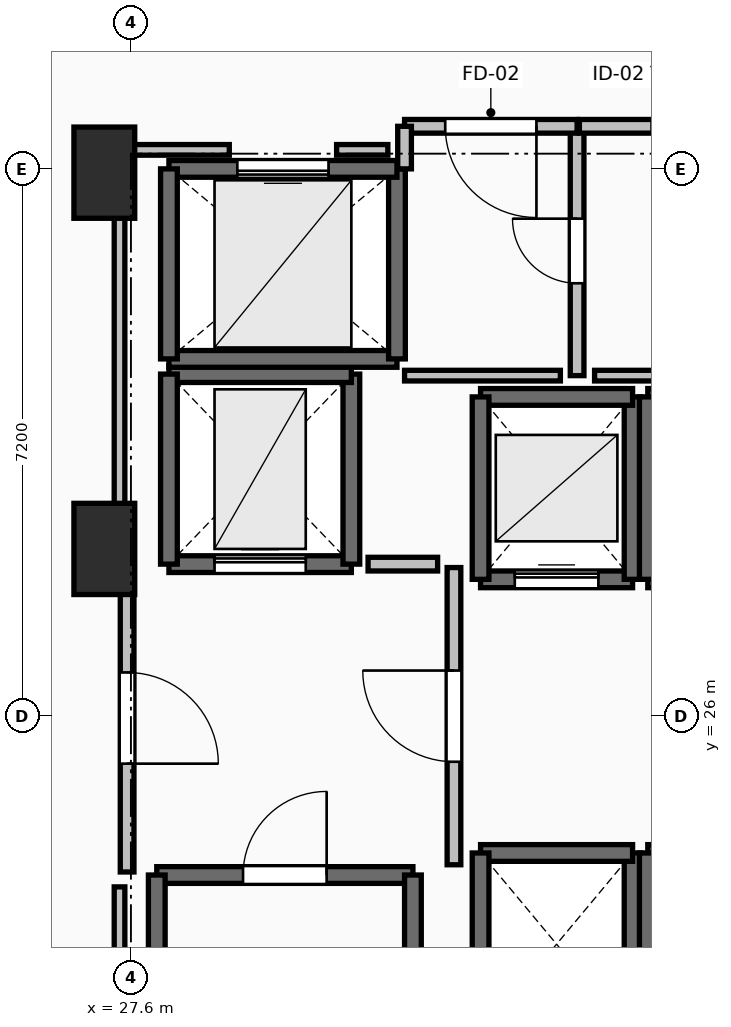
"""IFC4 building model, lengths in metres.
Left out: names, types, materials, properties, quantities, classifications, styles, units other than length and angle.
Written with IfcOpenShell. Run it as: python <this file> out.ifc"""

import sys

from ifc_helpers import new_model, si_unit, direction, frame, frame_2d, origin, origin_2d, place, context, subcontext, project, spatial, rectangle, extrude, element, fill, save


model = new_model("IFC4")
c1 = context("Model", 3, precision=1e-05, world=origin(), true_north=direction((0.0, 1.0)))
c2 = subcontext(c1, "Body", "Model", "MODEL_VIEW")
j1 = project(units=[si_unit("LENGTHUNIT", "METRE"), si_unit("PLANEANGLEUNIT", "RADIAN")], contexts=[c1])
p1 = place(None, origin())
s1 = spatial("IfcSite", under=j1, at=p1, CompositionType="ELEMENT")
p2 = place(p1, origin())
s2 = spatial("IfcBuilding", under=s1, at=p2, CompositionType="ELEMENT")
p3 = place(p2, frame((0.0, 0.0, 48.5)))
s3 = spatial("IfcBuildingStorey", under=s2, at=p3, CompositionType="ELEMENT", Elevation=48.5)
for number, where, z_axis, x_axis in (
    (1, (27.25, 28.2, 0.0), (0.0, 0.0, 1.0), (1.0, 0.0, 0.0)),
    (2, (27.25, 33.15, 0.0), (0.0, 0.0, 1.0), (1.0, 0.0, 0.0)),
):
    element("IfcColumn", number, at=place(p3, frame(where, z_axis=z_axis, x_axis=x_axis)), inside=s3, PredefinedType="PILASTER", context=c2, shape_type="SweptSolid", body=[
        extrude(rectangle(XDim=0.8, YDim=1.2, at=origin_2d()), origin(), (0.0, 0.0, 1.0), 3.5),
    ])
p4 = place(p3, frame((27.94, 23.91, 0.0), z_axis=(0.0, 0.0, 1.0), x_axis=(1.0, 0.0, 0.0)))
e3 = element("IfcWall", 3, at=p4, inside=s3, PredefinedType="SOLIDWALL", context=c2, shape_type="SweptSolid", body=[
    extrude(rectangle(XDim=3.37, YDim=0.22, at=frame_2d((1.685, 0.0))), origin(), (0.0, 0.0, 1.0), 3.24),
])
p5 = place(p4, frame((1.135, 0.0, 0.0)))
e4 = element("IfcOpeningElement", 4, at=p5, cuts=e3, PredefinedType="OPENING", context=c2, shape_type="SweptSolid", body=[
    extrude(rectangle(XDim=1.1, YDim=2.15, at=frame_2d((0.55, 1.075))), frame((0.0, 0.125, 0.0), z_axis=(0.0, -1.0, 0.0), x_axis=(1.0, 0.0, 0.0)), (0.0, 0.0, 1.0), 0.25),
])
for number, where, z_axis, x_axis in (
    (5, (31.31, 23.91, 0.0), (0.0, 0.0, 1.0), (0.0, -1.0, 0.0)),
    (6, (27.94, 16.49, 0.0), (0.0, 0.0, 1.0), (0.0, 1.0, 0.0)),
):
    element("IfcWall", number, at=place(p3, frame(where, z_axis=z_axis, x_axis=x_axis)), inside=s3, PredefinedType="SOLIDWALL", context=c2, shape_type="SweptSolid", body=[
        extrude(rectangle(XDim=7.42, YDim=0.22, at=frame_2d((3.71, 0.0))), origin(), (0.0, 0.0, 1.0), 3.24),
    ])
p6 = place(p3, frame((32.2, 27.8, 0.0), z_axis=(0.0, 0.0, 1.0), x_axis=(1.0, 0.0, 0.0)))
e7 = element("IfcWall", 7, at=p6, inside=s3, PredefinedType="SOLIDWALL", context=c2, shape_type="SweptSolid", body=[
    extrude(rectangle(XDim=2.0, YDim=0.22, at=frame_2d((1.0, 0.0))), origin(), (0.0, 0.0, 1.0), 3.24),
])
p7 = place(p6, frame((0.45, 0.0, 0.0)))
e8 = element("IfcOpeningElement", 8, at=p7, cuts=e7, PredefinedType="OPENING", context=c2, shape_type="SweptSolid", body=[
    extrude(rectangle(XDim=1.1, YDim=2.2, at=frame_2d((0.55, 1.1))), frame((0.0, 0.125, 0.0), z_axis=(0.0, -1.0, 0.0), x_axis=(1.0, 0.0, 0.0)), (0.0, 0.0, 1.0), 0.25),
])
p8 = place(p3, frame((34.2, 27.8, 0.0), z_axis=(0.0, 0.0, 1.0), x_axis=(0.0, 1.0, 0.0)))
e9 = element("IfcWall", 9, at=p8, inside=s3, PredefinedType="SOLIDWALL", context=c2, shape_type="SweptSolid", body=[
    extrude(rectangle(XDim=2.4, YDim=0.22, at=frame_2d((1.2, 0.0))), origin(), (0.0, 0.0, 1.0), 3.24),
])
p9 = place(p3, frame((34.2, 30.2, 0.0), z_axis=(0.0, 0.0, 1.0), x_axis=(-1.0, 0.0, 0.0)))
e10 = element("IfcWall", 10, at=p9, inside=s3, PredefinedType="SOLIDWALL", context=c2, shape_type="SweptSolid", body=[
    extrude(rectangle(XDim=2.0, YDim=0.22, at=frame_2d((1.0, 0.0))), origin(), (0.0, 0.0, 1.0), 3.24),
])
p10 = place(p3, frame((32.2, 30.2, 0.0), z_axis=(0.0, 0.0, 1.0), x_axis=(0.0, -1.0, 0.0)))
e11 = element("IfcWall", 11, at=p10, inside=s3, PredefinedType="SOLIDWALL", context=c2, shape_type="SweptSolid", body=[
    extrude(rectangle(XDim=2.4, YDim=0.22, at=frame_2d((1.2, 0.0))), origin(), (0.0, 0.0, 1.0), 3.24),
])
p11 = place(p3, frame((34.4, 27.8, 0.0), z_axis=(0.0, 0.0, 1.0), x_axis=(1.0, 0.0, 0.0)))
e12 = element("IfcWall", 12, at=p11, inside=s3, PredefinedType="SOLIDWALL", context=c2, shape_type="SweptSolid", body=[
    extrude(rectangle(XDim=2.0, YDim=0.22, at=frame_2d((1.0, 0.0))), origin(), (0.0, 0.0, 1.0), 3.24),
])
p12 = place(p11, frame((0.45, 0.0, 0.0)))
e13 = element("IfcOpeningElement", 13, at=p12, cuts=e12, PredefinedType="OPENING", context=c2, shape_type="SweptSolid", body=[
    extrude(rectangle(XDim=1.1, YDim=2.2, at=frame_2d((0.55, 1.1))), frame((0.0, 0.125, 0.0), z_axis=(0.0, -1.0, 0.0), x_axis=(1.0, 0.0, 0.0)), (0.0, 0.0, 1.0), 0.25),
])
p13 = place(p3, frame((36.4, 30.2, 0.0), z_axis=(0.0, 0.0, 1.0), x_axis=(-1.0, 0.0, 0.0)))
e14 = element("IfcWall", 14, at=p13, inside=s3, PredefinedType="SOLIDWALL", context=c2, shape_type="SweptSolid", body=[
    extrude(rectangle(XDim=2.0, YDim=0.22, at=frame_2d((1.0, 0.0))), origin(), (0.0, 0.0, 1.0), 3.24),
])
for number, where, z_axis, x_axis in (
    (15, (34.4, 30.2, 0.0), (0.0, 0.0, 1.0), (0.0, -1.0, 0.0)),
    (16, (34.2, 21.8, 0.0), (0.0, 0.0, 1.0), (0.0, 1.0, 0.0)),
):
    element("IfcWall", number, at=place(p3, frame(where, z_axis=z_axis, x_axis=x_axis)), inside=s3, PredefinedType="SOLIDWALL", context=c2, shape_type="SweptSolid", body=[
        extrude(rectangle(XDim=2.4, YDim=0.22, at=frame_2d((1.2, 0.0))), origin(), (0.0, 0.0, 1.0), 3.24),
    ])
p14 = place(p3, frame((34.2, 24.2, 0.0), z_axis=(0.0, 0.0, 1.0), x_axis=(-1.0, 0.0, 0.0)))
e17 = element("IfcWall", 17, at=p14, inside=s3, PredefinedType="SOLIDWALL", context=c2, shape_type="SweptSolid", body=[
    extrude(rectangle(XDim=2.0, YDim=0.22, at=frame_2d((1.0, 0.0))), origin(), (0.0, 0.0, 1.0), 3.24),
])
p15 = place(p3, frame((32.2, 24.2, 0.0), z_axis=(0.0, 0.0, 1.0), x_axis=(0.0, -1.0, 0.0)))
e18 = element("IfcWall", 18, at=p15, inside=s3, PredefinedType="SOLIDWALL", context=c2, shape_type="SweptSolid", body=[
    extrude(rectangle(XDim=2.4, YDim=0.22, at=frame_2d((1.2, 0.0))), origin(), (0.0, 0.0, 1.0), 3.24),
])
p16 = place(p3, frame((36.4, 24.2, 0.0), z_axis=(0.0, 0.0, 1.0), x_axis=(-1.0, 0.0, 0.0)))
e19 = element("IfcWall", 19, at=p16, inside=s3, PredefinedType="SOLIDWALL", context=c2, shape_type="SweptSolid", body=[
    extrude(rectangle(XDim=2.0, YDim=0.22, at=frame_2d((1.0, 0.0))), origin(), (0.0, 0.0, 1.0), 3.24),
])
p17 = place(p3, frame((34.4, 24.2, 0.0), z_axis=(0.0, 0.0, 1.0), x_axis=(0.0, -1.0, 0.0)))
e20 = element("IfcWall", 20, at=p17, inside=s3, PredefinedType="SOLIDWALL", context=c2, shape_type="SweptSolid", body=[
    extrude(rectangle(XDim=2.4, YDim=0.22, at=frame_2d((1.2, 0.0))), origin(), (0.0, 0.0, 1.0), 3.24),
])
p18 = place(p3, frame((28.1, 28.0, 0.0), z_axis=(0.0, 0.0, 1.0), x_axis=(1.0, 0.0, 0.0)))
e21 = element("IfcWall", 21, at=p18, inside=s3, PredefinedType="SHEAR", context=c2, shape_type="SweptSolid", body=[
    extrude(rectangle(XDim=2.4, YDim=0.22, at=frame_2d((1.2, 0.0))), origin(), (0.0, 0.0, 1.0), 3.24),
])
p19 = place(p18, frame((0.6, 0.0, 0.0)))
e22 = element("IfcOpeningElement", 22, at=p19, cuts=e21, PredefinedType="OPENING", context=c2, shape_type="SweptSolid", body=[
    extrude(rectangle(XDim=1.2, YDim=2.2, at=frame_2d((0.6, 1.1))), frame((0.0, 0.125, 0.0), z_axis=(0.0, -1.0, 0.0), x_axis=(1.0, 0.0, 0.0)), (0.0, 0.0, 1.0), 0.25),
])
p20 = place(p3, frame((30.5, 28.0, 0.0), z_axis=(0.0, 0.0, 1.0), x_axis=(0.0, 1.0, 0.0)))
e23 = element("IfcWall", 23, at=p20, inside=s3, PredefinedType="SHEAR", context=c2, shape_type="SweptSolid", body=[
    extrude(rectangle(XDim=2.5, YDim=0.22, at=frame_2d((1.25, 0.0))), origin(), (0.0, 0.0, 1.0), 3.24),
])
p21 = place(p3, frame((30.5, 30.5, 0.0), z_axis=(0.0, 0.0, 1.0), x_axis=(-1.0, 0.0, 0.0)))
e24 = element("IfcWall", 24, at=p21, inside=s3, PredefinedType="SHEAR", context=c2, shape_type="SweptSolid", body=[
    extrude(rectangle(XDim=2.4, YDim=0.22, at=frame_2d((1.2, 0.0))), origin(), (0.0, 0.0, 1.0), 3.24),
])
p22 = place(p3, frame((28.1, 30.5, 0.0), z_axis=(0.0, 0.0, 1.0), x_axis=(0.0, -1.0, 0.0)))
e25 = element("IfcWall", 25, at=p22, inside=s3, PredefinedType="SHEAR", context=c2, shape_type="SweptSolid", body=[
    extrude(rectangle(XDim=2.5, YDim=0.22, at=frame_2d((1.25, 0.0))), origin(), (0.0, 0.0, 1.0), 3.24),
])
p23 = place(p3, frame((28.1, 30.7, 0.0), z_axis=(0.0, 0.0, 1.0), x_axis=(1.0, 0.0, 0.0)))
e26 = element("IfcWall", 26, at=p23, inside=s3, PredefinedType="SOLIDWALL", context=c2, shape_type="SweptSolid", body=[
    extrude(rectangle(XDim=3.0, YDim=0.22, at=frame_2d((1.5, 0.0))), origin(), (0.0, 0.0, 1.0), 3.24),
])
p24 = place(p3, frame((31.1, 30.7, 0.0), z_axis=(0.0, 0.0, 1.0), x_axis=(0.0, 1.0, 0.0)))
e27 = element("IfcWall", 27, at=p24, inside=s3, PredefinedType="SOLIDWALL", context=c2, shape_type="SweptSolid", body=[
    extrude(rectangle(XDim=2.5, YDim=0.22, at=frame_2d((1.25, 0.0))), origin(), (0.0, 0.0, 1.0), 3.24),
])
p25 = place(p3, frame((31.1, 33.2, 0.0), z_axis=(0.0, 0.0, 1.0), x_axis=(-1.0, 0.0, 0.0)))
e28 = element("IfcWall", 28, at=p25, inside=s3, PredefinedType="SOLIDWALL", context=c2, shape_type="SweptSolid", body=[
    extrude(rectangle(XDim=3.0, YDim=0.22, at=frame_2d((1.5, 0.0))), origin(), (0.0, 0.0, 1.0), 3.24),
])
p26 = place(p25, frame((0.9, 0.0, 0.0)))
e29 = element("IfcOpeningElement", 29, at=p26, cuts=e28, PredefinedType="OPENING", context=c2, shape_type="SweptSolid", body=[
    extrude(rectangle(XDim=1.2, YDim=2.2, at=frame_2d((0.6, 1.1))), frame((0.0, 0.125, 0.0), z_axis=(0.0, -1.0, 0.0), x_axis=(1.0, 0.0, 0.0)), (0.0, 0.0, 1.0), 0.25),
])
p27 = place(p3, frame((28.1, 33.2, 0.0), z_axis=(0.0, 0.0, 1.0), x_axis=(0.0, -1.0, 0.0)))
e30 = element("IfcWall", 30, at=p27, inside=s3, PredefinedType="SOLIDWALL", context=c2, shape_type="SweptSolid", body=[
    extrude(rectangle(XDim=2.5, YDim=0.22, at=frame_2d((1.25, 0.0))), origin(), (0.0, 0.0, 1.0), 3.24),
])
p28 = place(p3, frame((31.85, 24.045, 0.0), z_axis=(0.0, 0.0, 1.0), x_axis=(0.0, 1.0, 0.0)))
e31 = element("IfcWall", 31, at=p28, inside=s3, PredefinedType="PARTITIONING", context=c2, shape_type="SweptSolid", body=[
    extrude(rectangle(XDim=3.91, YDim=0.18, at=frame_2d((1.955, 0.0))), origin(), (0.0, 0.0, 1.0), 3.24),
])
p29 = place(p28, frame((1.355, 0.0, 0.0)))
e32 = element("IfcOpeningElement", 32, at=p29, cuts=e31, PredefinedType="OPENING", context=c2, shape_type="SweptSolid", body=[
    extrude(rectangle(XDim=1.2, YDim=2.15, at=frame_2d((0.6, 1.075))), frame((0.0, 0.105, 0.0), z_axis=(0.0, -1.0, 0.0), x_axis=(1.0, 0.0, 0.0)), (0.0, 0.0, 1.0), 0.21),
])
p30 = place(p3, frame((27.55, 28.0, 0.0), z_axis=(0.0, 0.0, 1.0), x_axis=(0.0, -1.0, 0.0)))
e33 = element("IfcWall", 33, at=p30, inside=s3, PredefinedType="PARTITIONING", context=c2, shape_type="SweptSolid", body=[
    extrude(rectangle(XDim=4.05, YDim=0.18, at=frame_2d((2.025, 0.0))), origin(), (0.0, 0.0, 1.0), 3.24),
])
p31 = place(p30, frame((1.425, 0.0, 0.0)))
e34 = element("IfcOpeningElement", 34, at=p31, cuts=e33, PredefinedType="OPENING", context=c2, shape_type="SweptSolid", body=[
    extrude(rectangle(XDim=1.2, YDim=2.15, at=frame_2d((0.6, 1.075))), frame((0.0, 0.105, 0.0), z_axis=(0.0, -1.0, 0.0), x_axis=(1.0, 0.0, 0.0)), (0.0, 0.0, 1.0), 0.21),
])
p32 = place(p3, frame((33.47, 30.48, 0.0), z_axis=(0.0, 0.0, 1.0), x_axis=(0.0, 1.0, 0.0)))
e35 = element("IfcWall", 35, at=p32, inside=s3, PredefinedType="PARTITIONING", context=c2, shape_type="SweptSolid", body=[
    extrude(rectangle(XDim=3.28, YDim=0.18, at=frame_2d((1.64, 0.0))), origin(), (0.0, 0.0, 1.0), 3.24),
])
p33 = place(p32, frame((1.215, 0.0, 0.0)))
e36 = element("IfcOpeningElement", 36, at=p33, cuts=e35, PredefinedType="OPENING", context=c2, shape_type="SweptSolid", body=[
    extrude(rectangle(XDim=0.85, YDim=2.1, at=frame_2d((0.425, 1.05))), frame((0.0, 0.105, 0.0), z_axis=(0.0, -1.0, 0.0), x_axis=(1.0, 0.0, 0.0)), (0.0, 0.0, 1.0), 0.21),
])
p34 = place(p3, frame((33.47, 33.76, 0.0), z_axis=(0.0, 0.0, 1.0), x_axis=(-1.0, 0.0, 0.0)))
e37 = element("IfcWall", 37, at=p34, inside=s3, PredefinedType="PARTITIONING", context=c2, shape_type="SweptSolid", body=[
    extrude(rectangle(XDim=2.27, YDim=0.18, at=frame_2d((1.135, 0.0))), origin(), (0.0, 0.0, 1.0), 3.24),
])
p35 = place(p34, frame((0.535, 0.0, 0.0)))
e38 = element("IfcOpeningElement", 38, at=p35, cuts=e37, PredefinedType="OPENING", context=c2, shape_type="SweptSolid", body=[
    extrude(rectangle(XDim=1.2, YDim=2.15, at=frame_2d((0.6, 1.075))), frame((0.0, 0.105, 0.0), z_axis=(0.0, -1.0, 0.0), x_axis=(1.0, 0.0, 0.0)), (0.0, 0.0, 1.0), 0.21),
])
p36 = place(p3, frame((31.2, 33.76, 0.0), z_axis=(0.0, 0.0, 1.0), x_axis=(0.0, -1.0, 0.0)))
e39 = element("IfcWall", 39, at=p36, inside=s3, PredefinedType="PARTITIONING", context=c2, shape_type="SweptSolid", body=[
    extrude(rectangle(XDim=0.56, YDim=0.18, at=frame_2d((0.28, 0.0))), origin(), (0.0, 0.0, 1.0), 3.24),
])
p37 = place(p3, frame((36.25, 33.76, 0.0), z_axis=(0.0, 0.0, 1.0), x_axis=(-1.0, 0.0, 0.0)))
e40 = element("IfcWall", 40, at=p37, inside=s3, PredefinedType="PARTITIONING", context=c2, shape_type="SweptSolid", body=[
    extrude(rectangle(XDim=2.75, YDim=0.18, at=frame_2d((1.375, 0.0))), origin(), (0.0, 0.0, 1.0), 3.24),
])
p38 = place(p37, frame((0.95, 0.0, 0.0)))
e41 = element("IfcOpeningElement", 41, at=p38, cuts=e40, PredefinedType="OPENING", context=c2, shape_type="SweptSolid", body=[
    extrude(rectangle(XDim=0.85, YDim=2.1, at=frame_2d((0.425, 1.05))), frame((0.0, 0.105, 0.0), z_axis=(0.0, -1.0, 0.0), x_axis=(1.0, 0.0, 0.0)), (0.0, 0.0, 1.0), 0.21),
])
p39 = place(p3, frame((31.635, 28.0, 0.0), z_axis=(0.0, 0.0, 1.0), x_axis=(-1.0, 0.0, 0.0)))
e42 = element("IfcWall", 42, at=p39, inside=s3, PredefinedType="PARTITIONING", context=c2, shape_type="SweptSolid", body=[
    extrude(rectangle(XDim=0.915, YDim=0.18, at=frame_2d((0.458, 0.0))), origin(), (0.0, 0.0, 1.0), 3.24),
])
p40 = place(p3, frame((31.2, 30.48, 0.0), z_axis=(0.0, 0.0, 1.0), x_axis=(1.0, 0.0, 0.0)))
e43 = element("IfcWall", 43, at=p40, inside=s3, PredefinedType="PARTITIONING", context=c2, shape_type="SweptSolid", body=[
    extrude(rectangle(XDim=2.05, YDim=0.14, at=frame_2d((1.025, 0.0))), origin(), (0.0, 0.0, 1.0), 3.24),
])
p41 = place(p3, frame((33.7, 30.48, 0.0), z_axis=(0.0, 0.0, 1.0), x_axis=(1.0, 0.0, 0.0)))
e44 = element("IfcWall", 44, at=p41, inside=s3, PredefinedType="PARTITIONING", context=c2, shape_type="SweptSolid", body=[
    extrude(rectangle(XDim=2.33, YDim=0.14, at=frame_2d((1.165, 0.0))), origin(), (0.0, 0.0, 1.0), 2.432),
])
p42 = place(p3, frame((27.45, 16.24, 0.0), z_axis=(0.0, 0.0, 1.0), x_axis=(0.0, 1.0, 0.0)))
e45 = element("IfcWall", 45, at=p42, inside=s3, PredefinedType="PARTITIONING", context=c2, shape_type="SweptSolid", body=[
    extrude(rectangle(XDim=7.514, YDim=0.14, at=frame_2d((3.757, 0.0))), origin(), (0.0, 0.0, 1.0), 2.432),
])
p43 = place(p3, frame((27.45, 28.196, 0.0), z_axis=(0.0, 0.0, 1.0), x_axis=(0.0, 1.0, 0.0)))
e46 = element("IfcWall", 46, at=p43, inside=s3, PredefinedType="PARTITIONING", context=c2, shape_type="SweptSolid", body=[
    extrude(rectangle(XDim=5.254, YDim=0.14, at=frame_2d((2.627, 0.0))), origin(), (0.0, 0.0, 1.0), 2.432),
])
p44 = place(p3, frame((27.45, 33.45, 0.0), z_axis=(0.0, 0.0, 1.0), x_axis=(1.0, 0.0, 0.0)))
e47 = element("IfcWall", 47, at=p44, inside=s3, PredefinedType="PARTITIONING", context=c2, shape_type="SweptSolid", body=[
    extrude(rectangle(XDim=1.444, YDim=0.14, at=frame_2d((0.722, 0.0))), origin(), (0.0, 0.0, 1.0), 2.432),
])
p45 = place(p3, frame((30.306, 33.45, 0.0), z_axis=(0.0, 0.0, 1.0), x_axis=(1.0, 0.0, 0.0)))
e48 = element("IfcWall", 48, at=p45, inside=s3, PredefinedType="PARTITIONING", context=c2, shape_type="SweptSolid", body=[
    extrude(rectangle(XDim=0.674, YDim=0.14, at=frame_2d((0.337, 0.0))), origin(), (0.0, 0.0, 1.0), 3.24),
])
p46 = place(p5, origin())
e49 = element("IfcDoor", 49, at=p46, inside=s3, OperationType="SINGLE_SWING_RIGHT", PredefinedType="DOOR", context=c2, shape_type="SweptSolid", body=[
    extrude(rectangle(XDim=1.1, YDim=2.15, at=frame_2d((0.55, 1.075))), frame((0.0, 0.025, 0.0), z_axis=(0.0, -1.0, 0.0), x_axis=(1.0, 0.0, 0.0)), (0.0, 0.0, 1.0), 0.05),
])
fill(e4, e49)
p47 = place(p7, origin())
e50 = element("IfcDoor", 50, at=p47, inside=s3, OperationType="SLIDING_TO_LEFT", PredefinedType="DOOR", context=c2, shape_type="SweptSolid", body=[
    extrude(rectangle(XDim=1.1, YDim=2.2, at=frame_2d((0.55, 1.1))), frame((0.0, 0.025, 0.0), z_axis=(0.0, -1.0, 0.0), x_axis=(1.0, 0.0, 0.0)), (0.0, 0.0, 1.0), 0.05),
])
fill(e8, e50)
p48 = place(p19, origin())
e51 = element("IfcDoor", 51, at=p48, inside=s3, OperationType="SLIDING_TO_LEFT", PredefinedType="DOOR", context=c2, shape_type="SweptSolid", body=[
    extrude(rectangle(XDim=1.2, YDim=2.2, at=frame_2d((0.6, 1.1))), frame((0.0, 0.025, 0.0), z_axis=(0.0, -1.0, 0.0), x_axis=(1.0, 0.0, 0.0)), (0.0, 0.0, 1.0), 0.05),
])
fill(e22, e51)
p49 = place(p26, origin())
e52 = element("IfcDoor", 52, at=p49, inside=s3, OperationType="SLIDING_TO_LEFT", PredefinedType="DOOR", context=c2, shape_type="SweptSolid", body=[
    extrude(rectangle(XDim=1.2, YDim=2.2, at=frame_2d((0.6, 1.1))), frame((0.0, 0.025, 0.0), z_axis=(0.0, -1.0, 0.0), x_axis=(1.0, 0.0, 0.0)), (0.0, 0.0, 1.0), 0.05),
])
fill(e29, e52)
p50 = place(p29, origin())
e53 = element("IfcDoor", 53, at=p50, inside=s3, OperationType="SINGLE_SWING_RIGHT", PredefinedType="DOOR", context=c2, shape_type="SweptSolid", body=[
    extrude(rectangle(XDim=1.2, YDim=2.15, at=frame_2d((0.6, 1.075))), frame((0.0, 0.025, 0.0), z_axis=(0.0, -1.0, 0.0), x_axis=(1.0, 0.0, 0.0)), (0.0, 0.0, 1.0), 0.05),
])
fill(e32, e53)
p51 = place(p31, origin())
e54 = element("IfcDoor", 54, at=p51, inside=s3, OperationType="SINGLE_SWING_RIGHT", PredefinedType="DOOR", context=c2, shape_type="SweptSolid", body=[
    extrude(rectangle(XDim=1.2, YDim=2.15, at=frame_2d((0.6, 1.075))), frame((0.0, 0.025, 0.0), z_axis=(0.0, -1.0, 0.0), x_axis=(1.0, 0.0, 0.0)), (0.0, 0.0, 1.0), 0.05),
])
fill(e34, e54)
p52 = place(p33, origin())
e55 = element("IfcDoor", 55, at=p52, inside=s3, OperationType="SINGLE_SWING_RIGHT", PredefinedType="DOOR", context=c2, shape_type="SweptSolid", body=[
    extrude(rectangle(XDim=0.85, YDim=2.1, at=frame_2d((0.425, 1.05))), frame((0.0, 0.025, 0.0), z_axis=(0.0, -1.0, 0.0), x_axis=(1.0, 0.0, 0.0)), (0.0, 0.0, 1.0), 0.05),
])
fill(e36, e55)
p53 = place(p35, origin())
e56 = element("IfcDoor", 56, at=p53, inside=s3, OperationType="SINGLE_SWING_LEFT", PredefinedType="DOOR", context=c2, shape_type="SweptSolid", body=[
    extrude(rectangle(XDim=1.2, YDim=2.15, at=frame_2d((0.6, 1.075))), frame((0.0, 0.025, 0.0), z_axis=(0.0, -1.0, 0.0), x_axis=(1.0, 0.0, 0.0)), (0.0, 0.0, 1.0), 0.05),
])
fill(e38, e56)
save(model, sys.argv[1])
